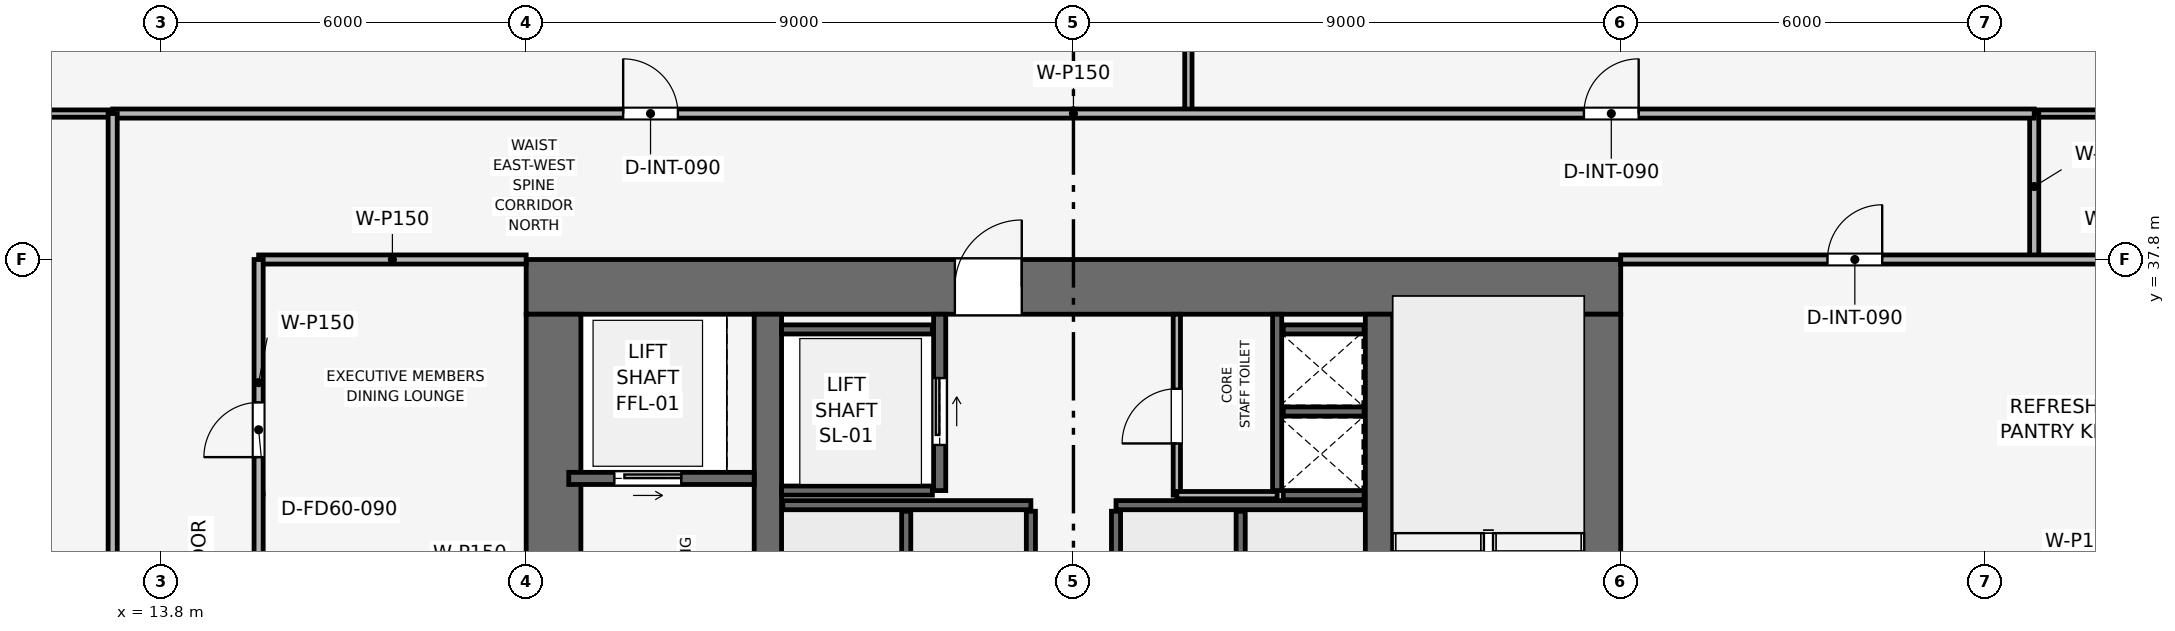
"""IFC4 building model, lengths in metres.
Left out: names, types, materials, properties, quantities, classifications, styles, units other than length and angle.
Written with IfcOpenShell. Run it as: python <this file> out.ifc"""

import sys

from ifc_helpers import new_model, si_unit, direction, frame, frame_2d, origin, place, context, subcontext, project, spatial, rectangle, extrude, element, fill, save


model = new_model("IFC4")
c1 = context("Model", 3, precision=1e-05, world=origin(), true_north=direction((0.0, 1.0)))
c2 = subcontext(c1, "Body", "Model", "MODEL_VIEW")
j1 = project(units=[si_unit("LENGTHUNIT", "METRE"), si_unit("PLANEANGLEUNIT", "RADIAN")], contexts=[c1])
p1 = place(None, origin())
s1 = spatial("IfcSite", under=j1, at=p1, CompositionType="ELEMENT")
p2 = place(p1, origin())
s2 = spatial("IfcBuilding", under=s1, at=p2, CompositionType="ELEMENT")
p3 = place(p2, frame((0.0, 0.0, 149.55)))
s3 = spatial("IfcBuildingStorey", under=s2, at=p3, CompositionType="ELEMENT", Elevation=149.55)
p4 = place(p3, frame((19.8, 37.35, 0.0), z_axis=(0.0, 0.0, 1.0), x_axis=(1.0, 0.0, 0.0)))
e1 = element("IfcWall", 1, at=p4, inside=s3, PredefinedType="SHEAR", context=c2, shape_type="SweptSolid", body=[
    extrude(rectangle(XDim=18.0, YDim=0.9, at=frame_2d((9.0, 0.0))), origin(), (0.0, 0.0, 1.0), 3.75),
])
p5 = place(p4, frame((7.05, 0.0, 0.0)))
e2 = element("IfcOpeningElement", 2, at=p5, cuts=e1, PredefinedType="OPENING", context=c2, shape_type="SweptSolid", body=[
    extrude(rectangle(XDim=1.1, YDim=2.15, at=frame_2d((0.55, 1.075))), frame((0.0, 0.46, 0.0), z_axis=(0.0, -1.0, 0.0), x_axis=(1.0, 0.0, 0.0)), (0.0, 0.0, 1.0), 0.92),
])
p6 = place(p3, frame((20.25, 20.7, 0.0), z_axis=(0.0, 0.0, 1.0), x_axis=(0.0, 1.0, 0.0)))
e3 = element("IfcWall", 3, at=p6, inside=s3, PredefinedType="SHEAR", context=c2, shape_type="SweptSolid", body=[
    extrude(rectangle(XDim=16.2, YDim=0.9, at=frame_2d((8.1, 0.0))), origin(), (0.0, 0.0, 1.0), 3.75),
])
p7 = place(p6, frame((10.1, 0.0, 0.0)))
e4 = element("IfcOpeningElement", 4, at=p7, cuts=e3, PredefinedType="OPENING", context=c2, shape_type="SweptSolid", body=[
    extrude(rectangle(XDim=1.1, YDim=2.15, at=frame_2d((0.55, 1.075))), frame((0.0, 0.46, 0.0), z_axis=(0.0, -1.0, 0.0), x_axis=(1.0, 0.0, 0.0)), (0.0, 0.0, 1.0), 0.92),
])
p8 = place(p3, frame((37.35, 20.7, 0.0), z_axis=(0.0, 0.0, 1.0), x_axis=(0.0, 1.0, 0.0)))
e5 = element("IfcWall", 5, at=p8, inside=s3, PredefinedType="SHEAR", context=c2, shape_type="SweptSolid", body=[
    extrude(rectangle(XDim=16.2, YDim=0.9, at=frame_2d((8.1, 0.0))), origin(), (0.0, 0.0, 1.0), 3.75),
])
p9 = place(p8, frame((4.6, 0.0, 0.0)))
e6 = element("IfcOpeningElement", 6, at=p9, cuts=e5, PredefinedType="OPENING", context=c2, shape_type="SweptSolid", body=[
    extrude(rectangle(XDim=1.1, YDim=2.15, at=frame_2d((0.55, 1.075))), frame((0.0, 0.46, 0.0), z_axis=(0.0, -1.0, 0.0), x_axis=(1.0, 0.0, 0.0)), (0.0, 0.0, 1.0), 0.92),
])
for number, where, z_axis, x_axis in (
    (7, (23.775, 20.7, 0.0), (0.0, 0.0, 1.0), (0.0, 1.0, 0.0)),
    (8, (33.825, 20.7, 0.0), (0.0, 0.0, 1.0), (0.0, 1.0, 0.0)),
):
    element("IfcWall", number, at=place(p3, frame(where, z_axis=z_axis, x_axis=x_axis)), inside=s3, PredefinedType="SHEAR", context=c2, shape_type="SweptSolid", body=[
        extrude(rectangle(XDim=16.2, YDim=0.45, at=frame_2d((8.1, 0.0))), origin(), (0.0, 0.0, 1.0), 3.75),
    ])
p10 = place(p3, frame((32.15, 34.0, 0.0), z_axis=(0.0, 0.0, 1.0), x_axis=(0.0, 1.0, 0.0)))
e9 = element("IfcWall", 9, at=p10, inside=s3, PredefinedType="SHEAR", context=c2, shape_type="SweptSolid", body=[
    extrude(rectangle(XDim=2.9, YDim=0.15, at=frame_2d((1.45, 0.0))), origin(), (0.0, 0.0, 1.0), 3.495),
])
for number, where, z_axis, x_axis in (
    (10, (32.25, 33.925, 0.0), (0.0, 0.0, 1.0), (1.0, 0.0, 0.0)),
    (11, (32.25, 35.3, 0.0), (0.0, 0.0, 1.0), (1.0, 0.0, 0.0)),
):
    element("IfcWall", number, at=place(p3, frame(where, z_axis=z_axis, x_axis=x_axis)), inside=s3, PredefinedType="SHEAR", context=c2, shape_type="SweptSolid", body=[
        extrude(rectangle(XDim=1.33, YDim=0.15, at=frame_2d((0.665, 0.0))), origin(), (0.0, 0.0, 1.0), 3.495),
    ])
p11 = place(p3, frame((20.5, 34.2, 0.0), z_axis=(0.0, 0.0, 1.0), x_axis=(1.0, 0.0, 0.0)))
e12 = element("IfcWall", 12, at=p11, inside=s3, PredefinedType="SHEAR", context=c2, shape_type="SweptSolid", body=[
    extrude(rectangle(XDim=3.05, YDim=0.2, at=frame_2d((1.525, 0.0))), origin(), (0.0, 0.0, 1.0), 3.495),
])
p12 = place(p11, frame((0.75, 0.0, 0.0)))
e13 = element("IfcOpeningElement", 13, at=p12, cuts=e12, PredefinedType="OPENING", context=c2, shape_type="SweptSolid", body=[
    extrude(rectangle(XDim=1.1, YDim=2.15, at=frame_2d((0.55, 1.075))), frame((0.0, 0.11, 0.0), z_axis=(0.0, -1.0, 0.0), x_axis=(1.0, 0.0, 0.0)), (0.0, 0.0, 1.0), 0.22),
])
p13 = place(p3, frame((26.6, 34.0, 0.0), z_axis=(0.0, 0.0, 1.0), x_axis=(0.0, 1.0, 0.0)))
e14 = element("IfcWall", 14, at=p13, inside=s3, PredefinedType="SHEAR", context=c2, shape_type="SweptSolid", body=[
    extrude(rectangle(XDim=2.9, YDim=0.2, at=frame_2d((1.45, 0.0))), origin(), (0.0, 0.0, 1.0), 3.495),
])
p14 = place(p13, frame((0.75, 0.0, 0.0)))
e15 = element("IfcOpeningElement", 15, at=p14, cuts=e14, PredefinedType="OPENING", context=c2, shape_type="SweptSolid", body=[
    extrude(rectangle(XDim=1.1, YDim=2.15, at=frame_2d((0.55, 1.075))), frame((0.0, 0.11, 0.0), z_axis=(0.0, -1.0, 0.0), x_axis=(1.0, 0.0, 0.0)), (0.0, 0.0, 1.0), 0.22),
])
for number, where, z_axis, x_axis in (
    (16, (24.0, 34.0, 0.0), (0.0, 0.0, 1.0), (1.0, 0.0, 0.0)),
    (17, (24.0, 36.65, 0.0), (0.0, 0.0, 1.0), (1.0, 0.0, 0.0)),
):
    element("IfcWall", number, at=place(p3, frame(where, z_axis=z_axis, x_axis=x_axis)), inside=s3, PredefinedType="SHEAR", context=c2, shape_type="SweptSolid", body=[
        extrude(rectangle(XDim=2.48, YDim=0.15, at=frame_2d((1.24, 0.0))), origin(), (0.0, 0.0, 1.0), 3.495),
    ])
p15 = place(p3, frame((32.25, 36.65, 0.0), z_axis=(0.0, 0.0, 1.0), x_axis=(1.0, 0.0, 0.0)))
e18 = element("IfcWall", 18, at=p15, inside=s3, PredefinedType="SHEAR", context=c2, shape_type="SweptSolid", body=[
    extrude(rectangle(XDim=1.33, YDim=0.15, at=frame_2d((0.665, 0.0))), origin(), (0.0, 0.0, 1.0), 3.495),
])
for number, where, z_axis, x_axis in (
    (19, (24.02, 33.76, 0.0), (0.0, 0.0, 1.0), (1.0, 0.0, 0.0)),
    (20, (29.5, 33.76, 0.0), (0.0, 0.0, 1.0), (1.0, 0.0, 0.0)),
):
    element("IfcWall", number, at=place(p3, frame(where, z_axis=z_axis, x_axis=x_axis)), inside=s3, PredefinedType="SHEAR", context=c2, shape_type="SweptSolid", body=[
        extrude(rectangle(XDim=4.08, YDim=0.15, at=frame_2d((2.04, 0.0))), origin(), (0.0, 0.0, 1.0), 3.495),
    ])
for number, where, z_axis, x_axis in (
    (21, (26.05, 31.42, 0.0), (0.0, 0.0, 1.0), (0.0, 1.0, 0.0)),
    (22, (28.1, 31.42, 0.0), (0.0, 0.0, 1.0), (0.0, 1.0, 0.0)),
    (23, (29.5, 31.42, 0.0), (0.0, 0.0, 1.0), (0.0, 1.0, 0.0)),
    (24, (31.55, 31.42, 0.0), (0.0, 0.0, 1.0), (0.0, 1.0, 0.0)),
):
    element("IfcWall", number, at=place(p3, frame(where, z_axis=z_axis, x_axis=x_axis)), inside=s3, PredefinedType="SHEAR", context=c2, shape_type="SweptSolid", body=[
        extrude(rectangle(XDim=2.24, YDim=0.15, at=frame_2d((1.12, 0.0))), origin(), (0.0, 0.0, 1.0), 3.495),
    ])
p16 = place(p3, frame((30.5, 33.925, 0.0), z_axis=(0.0, 0.0, 1.0), x_axis=(0.0, 1.0, 0.0)))
e25 = element("IfcWall", 25, at=p16, inside=s3, PredefinedType="PARTITIONING", context=c2, shape_type="SweptSolid", body=[
    extrude(rectangle(XDim=2.975, YDim=0.12, at=frame_2d((1.487, 0.0))), origin(), (0.0, 0.0, 1.0), 3.495),
])
p17 = place(p16, frame((0.85, 0.0, 0.0)))
e26 = element("IfcOpeningElement", 26, at=p17, cuts=e25, PredefinedType="OPENING", context=c2, shape_type="SweptSolid", body=[
    extrude(rectangle(XDim=0.9, YDim=2.1, at=frame_2d((0.45, 1.05))), frame((0.0, 0.07, 0.0), z_axis=(0.0, -1.0, 0.0), x_axis=(1.0, 0.0, 0.0)), (0.0, 0.0, 1.0), 0.14),
])
p18 = place(p3, frame((30.5, 33.925, 0.0), z_axis=(0.0, 0.0, 1.0), x_axis=(1.0, 0.0, 0.0)))
e27 = element("IfcWall", 27, at=p18, inside=s3, PredefinedType="PARTITIONING", context=c2, shape_type="SweptSolid", body=[
    extrude(rectangle(XDim=1.65, YDim=0.12, at=frame_2d((0.825, 0.0))), origin(), (0.0, 0.0, 1.0), 3.495),
])
p19 = place(p3, frame((15.4, 37.8, 0.0), z_axis=(0.0, 0.0, 1.0), x_axis=(1.0, 0.0, 0.0)))
e28 = element("IfcWall", 28, at=p19, inside=s3, PredefinedType="PARTITIONING", context=c2, shape_type="SweptSolid", body=[
    extrude(rectangle(XDim=4.4, YDim=0.15, at=frame_2d((2.2, 0.0))), origin(), (0.0, 0.0, 1.0), 3.03),
])
p20 = place(p3, frame((15.4, 32.45, 0.0), z_axis=(0.0, 0.0, 1.0), x_axis=(0.0, 1.0, 0.0)))
e29 = element("IfcWall", 29, at=p20, inside=s3, PredefinedType="PARTITIONING", context=c2, shape_type="SweptSolid", body=[
    extrude(rectangle(XDim=5.35, YDim=0.15, at=frame_2d((2.675, 0.0))), origin(), (0.0, 0.0, 1.0), 3.03),
])
p21 = place(p20, frame((2.1, 0.0, 0.0)))
e30 = element("IfcOpeningElement", 30, at=p21, cuts=e29, PredefinedType="OPENING", context=c2, shape_type="SweptSolid", body=[
    extrude(rectangle(XDim=0.9, YDim=2.1, at=frame_2d((0.45, 1.05))), frame((0.0, 0.085, 0.0), z_axis=(0.0, -1.0, 0.0), x_axis=(1.0, 0.0, 0.0)), (0.0, 0.0, 1.0), 0.17),
])
p22 = place(p3, frame((30.69, 40.2, 0.0), z_axis=(0.0, 0.0, 1.0), x_axis=(0.0, 1.0, 0.0)))
e31 = element("IfcWall", 31, at=p22, inside=s3, PredefinedType="PARTITIONING", context=c2, shape_type="SweptSolid", body=[
    extrude(rectangle(XDim=12.77, YDim=0.12, at=frame_2d((6.385, 0.0))), origin(), (0.0, 0.0, 1.0), 2.98),
])
p23 = place(p3, frame((4.63, 40.2, 0.0), z_axis=(0.0, 0.0, 1.0), x_axis=(1.0, 0.0, 0.0)))
e32 = element("IfcWall", 32, at=p23, inside=s3, PredefinedType="PARTITIONING", context=c2, shape_type="SweptSolid", body=[
    extrude(rectangle(XDim=8.37, YDim=0.12, at=frame_2d((4.185, 0.0))), origin(), (0.0, 0.0, 1.0), 2.98),
])
p24 = place(p3, frame((44.6, 40.2, 0.0), z_axis=(0.0, 0.0, 1.0), x_axis=(1.0, 0.0, 0.0)))
e33 = element("IfcWall", 33, at=p24, inside=s3, PredefinedType="PARTITIONING", context=c2, shape_type="SweptSolid", body=[
    extrude(rectangle(XDim=8.37, YDim=0.12, at=frame_2d((4.185, 0.0))), origin(), (0.0, 0.0, 1.0), 2.98),
])
p25 = place(p3, frame((44.6, 37.8, 0.0), z_axis=(0.0, 0.0, 1.0), x_axis=(0.0, 1.0, 0.0)))
e34 = element("IfcWall", 34, at=p25, inside=s3, PredefinedType="PARTITIONING", context=c2, shape_type="SweptSolid", body=[
    extrude(rectangle(XDim=2.4, YDim=0.15, at=frame_2d((1.2, 0.0))), origin(), (0.0, 0.0, 1.0), 3.495),
])
p26 = place(p3, frame((37.8, 37.8, 0.0), z_axis=(0.0, 0.0, 1.0), x_axis=(1.0, 0.0, 0.0)))
e35 = element("IfcWall", 35, at=p26, inside=s3, PredefinedType="PARTITIONING", context=c2, shape_type="SweptSolid", body=[
    extrude(rectangle(XDim=15.17, YDim=0.15, at=frame_2d((7.585, 0.0))), origin(), (0.0, 0.0, 1.0), 2.98),
])
p27 = place(p26, frame((3.4, 0.0, 0.0)))
e36 = element("IfcOpeningElement", 36, at=p27, cuts=e35, PredefinedType="OPENING", context=c2, shape_type="SweptSolid", body=[
    extrude(rectangle(XDim=0.9, YDim=2.1, at=frame_2d((0.45, 1.05))), frame((0.0, 0.085, 0.0), z_axis=(0.0, -1.0, 0.0), x_axis=(1.0, 0.0, 0.0)), (0.0, 0.0, 1.0), 0.17),
])
p28 = place(p3, frame((13.0, 40.2, 0.0), z_axis=(0.0, 0.0, 1.0), x_axis=(1.0, 0.0, 0.0)))
e37 = element("IfcWall", 37, at=p28, inside=s3, PredefinedType="PARTITIONING", context=c2, shape_type="SweptSolid", body=[
    extrude(rectangle(XDim=31.6, YDim=0.15, at=frame_2d((15.8, 0.0))), origin(), (0.0, 0.0, 1.0), 3.03),
])
p29 = place(p28, frame((8.395, 0.0, 0.0)))
e38 = element("IfcOpeningElement", 38, at=p29, cuts=e37, PredefinedType="OPENING", context=c2, shape_type="SweptSolid", body=[
    extrude(rectangle(XDim=0.9, YDim=2.1, at=frame_2d((0.45, 1.05))), frame((0.0, 0.085, 0.0), z_axis=(0.0, -1.0, 0.0), x_axis=(1.0, 0.0, 0.0)), (0.0, 0.0, 1.0), 0.17),
])
p30 = place(p28, frame((24.195, 0.0, 0.0)))
e39 = element("IfcOpeningElement", 39, at=p30, cuts=e37, PredefinedType="OPENING", context=c2, shape_type="SweptSolid", body=[
    extrude(rectangle(XDim=0.9, YDim=2.1, at=frame_2d((0.45, 1.05))), frame((0.0, 0.085, 0.0), z_axis=(0.0, -1.0, 0.0), x_axis=(1.0, 0.0, 0.0)), (0.0, 0.0, 1.0), 0.17),
])
p31 = place(p3, frame((13.0, 17.4, 0.0), z_axis=(0.0, 0.0, 1.0), x_axis=(0.0, 1.0, 0.0)))
e40 = element("IfcWall", 40, at=p31, inside=s3, PredefinedType="PARTITIONING", context=c2, shape_type="SweptSolid", body=[
    extrude(rectangle(XDim=22.8, YDim=0.15, at=frame_2d((11.4, 0.0))), origin(), (0.0, 0.0, 1.0), 3.03),
])
p32 = place(p31, frame((10.95, 0.0, 0.0)))
e41 = element("IfcOpeningElement", 41, at=p32, cuts=e40, PredefinedType="OPENING", context=c2, shape_type="SweptSolid", body=[
    extrude(rectangle(XDim=0.9, YDim=2.1, at=frame_2d((0.45, 1.05))), frame((0.0, 0.085, 0.0), z_axis=(0.0, -1.0, 0.0), x_axis=(1.0, 0.0, 0.0)), (0.0, 0.0, 1.0), 0.17),
])
p33 = place(p12, origin())
e42 = element("IfcDoor", 42, at=p33, inside=s3, OperationType="SLIDING_TO_RIGHT", PredefinedType="DOOR", context=c2, shape_type="SweptSolid", body=[
    extrude(rectangle(XDim=1.1, YDim=2.15, at=frame_2d((0.55, 1.075))), frame((0.0, 0.025, 0.0), z_axis=(0.0, -1.0, 0.0), x_axis=(1.0, 0.0, 0.0)), (0.0, 0.0, 1.0), 0.05),
])
fill(e13, e42)
p34 = place(p14, origin())
e43 = element("IfcDoor", 43, at=p34, inside=s3, OperationType="SLIDING_TO_RIGHT", PredefinedType="DOOR", context=c2, shape_type="SweptSolid", body=[
    extrude(rectangle(XDim=1.1, YDim=2.15, at=frame_2d((0.55, 1.075))), frame((0.0, 0.025, 0.0), z_axis=(0.0, -1.0, 0.0), x_axis=(1.0, 0.0, 0.0)), (0.0, 0.0, 1.0), 0.05),
])
fill(e15, e43)
p35 = place(p17, origin())
e44 = element("IfcDoor", 44, at=p35, inside=s3, OperationType="SINGLE_SWING_LEFT", PredefinedType="DOOR", context=c2, shape_type="SweptSolid", body=[
    extrude(rectangle(XDim=0.9, YDim=2.1, at=frame_2d((0.45, 1.05))), frame((0.0, 0.025, 0.0), z_axis=(0.0, -1.0, 0.0), x_axis=(1.0, 0.0, 0.0)), (0.0, 0.0, 1.0), 0.05),
])
fill(e26, e44)
p36 = place(p21, origin())
e45 = element("IfcDoor", 45, at=p36, inside=s3, OperationType="SINGLE_SWING_LEFT", PredefinedType="DOOR", context=c2, shape_type="SweptSolid", body=[
    extrude(rectangle(XDim=0.9, YDim=2.1, at=frame_2d((0.45, 1.05))), frame((0.0, 0.025, 0.0), z_axis=(0.0, -1.0, 0.0), x_axis=(1.0, 0.0, 0.0)), (0.0, 0.0, 1.0), 0.05),
])
fill(e30, e45)
p37 = place(p27, origin())
e46 = element("IfcDoor", 46, at=p37, inside=s3, OperationType="SINGLE_SWING_RIGHT", PredefinedType="DOOR", context=c2, shape_type="SweptSolid", body=[
    extrude(rectangle(XDim=0.9, YDim=2.1, at=frame_2d((0.45, 1.05))), frame((0.0, 0.025, 0.0), z_axis=(0.0, -1.0, 0.0), x_axis=(1.0, 0.0, 0.0)), (0.0, 0.0, 1.0), 0.05),
])
fill(e36, e46)
p38 = place(p29, origin())
e47 = element("IfcDoor", 47, at=p38, inside=s3, OperationType="SINGLE_SWING_LEFT", PredefinedType="DOOR", context=c2, shape_type="SweptSolid", body=[
    extrude(rectangle(XDim=0.9, YDim=2.1, at=frame_2d((0.45, 1.05))), frame((0.0, 0.025, 0.0), z_axis=(0.0, -1.0, 0.0), x_axis=(1.0, 0.0, 0.0)), (0.0, 0.0, 1.0), 0.05),
])
fill(e38, e47)
p39 = place(p30, origin())
e48 = element("IfcDoor", 48, at=p39, inside=s3, OperationType="SINGLE_SWING_RIGHT", PredefinedType="DOOR", context=c2, shape_type="SweptSolid", body=[
    extrude(rectangle(XDim=0.9, YDim=2.1, at=frame_2d((0.45, 1.05))), frame((0.0, 0.025, 0.0), z_axis=(0.0, -1.0, 0.0), x_axis=(1.0, 0.0, 0.0)), (0.0, 0.0, 1.0), 0.05),
])
fill(e39, e48)
p40 = place(p5, origin())
e49 = element("IfcDoor", 49, at=p40, inside=s3, OperationType="SINGLE_SWING_RIGHT", PredefinedType="DOOR", context=c2, shape_type="SweptSolid", body=[
    extrude(rectangle(XDim=1.1, YDim=2.15, at=frame_2d((0.55, 1.075))), frame((0.0, 0.025, 0.0), z_axis=(0.0, -1.0, 0.0), x_axis=(1.0, 0.0, 0.0)), (0.0, 0.0, 1.0), 0.05),
])
fill(e2, e49)
save(model, sys.argv[1])
